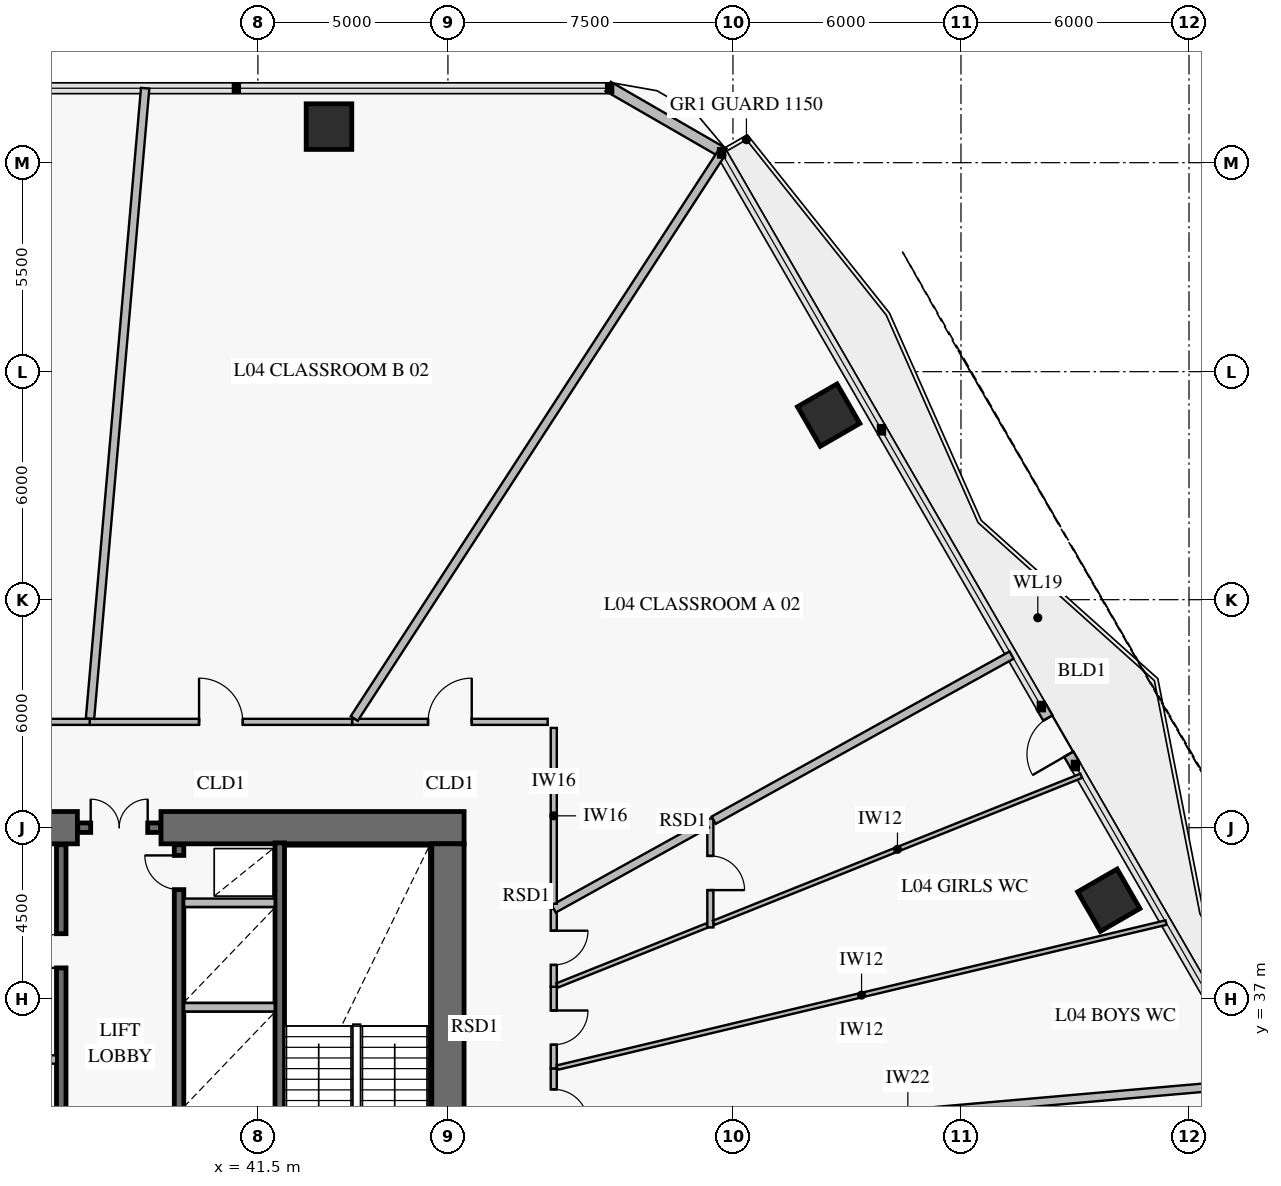
"""IFC4 building model, lengths in metres.
Left out: names, types, materials, properties, quantities, classifications, styles, units other than length and angle.
Written with IfcOpenShell. Run it as: python <this file> out.ifc"""

import sys

from ifc_helpers import new_model, si_unit, direction, frame, frame_2d, origin, origin_2d, place, context, subcontext, project, spatial, rectangle, extrude, element, fill, save


model = new_model("IFC4")
c1 = context("Model", 3, precision=1e-05, world=origin(), true_north=direction((0.0, 1.0)))
c2 = subcontext(c1, "Body", "Model", "MODEL_VIEW")
j1 = project(units=[si_unit("LENGTHUNIT", "METRE"), si_unit("PLANEANGLEUNIT", "RADIAN")], contexts=[c1])
p1 = place(None, origin())
s1 = spatial("IfcSite", under=j1, at=p1, CompositionType="ELEMENT")
p2 = place(p1, origin())
s2 = spatial("IfcBuilding", under=s1, at=p2, CompositionType="ELEMENT")
p3 = place(p2, frame((0.0, 0.0, 16.2)))
s3 = spatial("IfcBuildingStorey", under=s2, at=p3, CompositionType="ELEMENT", Elevation=16.2)
p4 = place(p3, frame((46.925, 41.5, 0.0), z_axis=(0.0, 0.0, 1.0), x_axis=(-1.0, 0.0, 0.0)))
e1 = element("IfcWall", 1, at=p4, inside=s3, PredefinedType="SHEAR", context=c2, shape_type="SweptSolid", body=[
    extrude(rectangle(XDim=7.975, YDim=0.85, at=frame_2d((3.988, 0.0))), origin(), (0.0, 0.0, 1.0), 4.2),
])
p5 = place(p3, frame((36.75, 41.5, 0.0), z_axis=(0.0, 0.0, 1.0), x_axis=(-1.0, 0.0, 0.0)))
e2 = element("IfcWall", 2, at=p5, inside=s3, PredefinedType="SHEAR", context=c2, shape_type="SweptSolid", body=[
    extrude(rectangle(XDim=11.675, YDim=0.85, at=frame_2d((5.837, 0.0))), origin(), (0.0, 0.0, 1.0), 4.2),
])
p6 = place(p5, frame((4.25, 0.0, 0.0)))
e3 = element("IfcOpeningElement", 3, at=p6, cuts=e2, PredefinedType="OPENING", context=c2, shape_type="SweptSolid", body=[
    extrude(rectangle(XDim=1.1, YDim=2.15, at=frame_2d((0.55, 1.075))), frame((0.0, 0.437, 0.0), z_axis=(0.0, -1.0, 0.0), x_axis=(1.0, 0.0, 0.0)), (0.0, 0.0, 1.0), 0.874),
])
p7 = place(p3, frame((46.5, 22.925, 0.0), z_axis=(0.0, 0.0, 1.0), x_axis=(0.0, 1.0, 0.0)))
e4 = element("IfcWall", 4, at=p7, inside=s3, PredefinedType="SHEAR", context=c2, shape_type="SweptSolid", body=[
    extrude(rectangle(XDim=18.15, YDim=0.85, at=frame_2d((9.075, 0.0))), origin(), (0.0, 0.0, 1.0), 4.2),
])
p8 = place(p7, frame((8.825, 0.0, 0.0)))
e5 = element("IfcOpeningElement", 5, at=p8, cuts=e4, PredefinedType="OPENING", context=c2, shape_type="SweptSolid", body=[
    extrude(rectangle(XDim=1.1, YDim=2.15, at=frame_2d((0.55, 1.075))), frame((0.0, 0.437, 0.0), z_axis=(0.0, -1.0, 0.0), x_axis=(1.0, 0.0, 0.0)), (0.0, 0.0, 1.0), 0.874),
])
for number, where, z_axis, x_axis in (
    (6, (63.889, 39.592, 0.0), (0.0, 0.0, 1.0), (-0.5, 0.866, 0.0)),
    (7, (56.519, 52.357, 0.0), (0.0, 0.0, 1.0), (-0.5, 0.866, 0.0)),
    (8, (43.37, 59.948, 0.0), (0.0, 0.0, 1.0), (-1.0, 0.0, 0.0)),
):
    element("IfcColumn", number, at=place(p3, frame(where, z_axis=z_axis, x_axis=x_axis)), inside=s3, PredefinedType="COLUMN", context=c2, shape_type="SweptSolid", body=[
        extrude(rectangle(XDim=1.2, YDim=1.2, at=origin_2d()), origin(), (0.0, 0.0, 1.0), 3.92),
    ])
p9 = place(p3, frame((50.717, 61.006, 0.0), z_axis=(0.0, 0.0, 1.0), x_axis=(0.866007452331, -0.500031091541, 0.0)))
e9 = element("IfcWall", 9, at=p9, inside=s3, PredefinedType="SOLIDWALL", context=c2, shape_type="SweptSolid", body=[
    extrude(rectangle(XDim=3.515, YDim=0.28, at=frame_2d((1.757, 0.0))), origin(), (0.0, 0.0, 1.0), 3.92),
])
p10 = place(p3, frame((62.114, 44.686, 0.0), z_axis=(0.0, 0.0, 1.0), x_axis=(0.499982180423, -0.866035691677, 0.0)))
e10 = element("IfcWall", 10, at=p10, inside=s3, PredefinedType="SOLIDWALL", context=c2, shape_type="SweptSolid", body=[
    extrude(rectangle(XDim=1.79, YDim=0.28, at=frame_2d((0.895, 0.0))), origin(), (0.0, 0.0, 1.0), 3.92),
])
p11 = place(p10, frame((0.345, 0.0, 0.0)))
e11 = element("IfcOpeningElement", 11, at=p11, cuts=e10, PredefinedType="OPENING", context=c2, shape_type="SweptSolid", body=[
    extrude(rectangle(XDim=1.1, YDim=2.2, at=frame_2d((0.55, 1.1))), frame((0.0, 0.152, 0.0), z_axis=(0.0, -1.0, 0.0), x_axis=(1.0, 0.0, 0.0)), (0.0, 0.0, 1.0), 0.304),
])
p12 = place(p3, frame((36.76, 41.5, 0.0), z_axis=(0.0, 0.0, 1.0), x_axis=(1.0, 0.0, 0.0)))
e12 = element("IfcWall", 12, at=p12, inside=s3, PredefinedType="SOLIDWALL", context=c2, shape_type="SweptSolid", body=[
    extrude(rectangle(XDim=2.18, YDim=0.25, at=frame_2d((1.09, 0.0))), origin(), (0.0, 0.0, 1.0), 4.2),
])
p13 = place(p12, frame((0.34, 0.0, 0.0)))
e13 = element("IfcOpeningElement", 13, at=p13, cuts=e12, PredefinedType="OPENING", context=c2, shape_type="SweptSolid", body=[
    extrude(rectangle(XDim=1.5, YDim=2.15, at=frame_2d((0.75, 1.075))), frame((0.0, 0.137, 0.0), z_axis=(0.0, -1.0, 0.0), x_axis=(1.0, 0.0, 0.0)), (0.0, 0.0, 1.0), 0.274),
])
p14 = place(p3, frame((42.075, 31.4, 0.0), z_axis=(0.0, 0.0, 1.0), x_axis=(0.0, 1.0, 0.0)))
e14 = element("IfcWall", 14, at=p14, inside=s3, PredefinedType="SOLIDWALL", context=c2, shape_type="SweptSolid", body=[
    extrude(rectangle(XDim=9.7, YDim=0.25, at=frame_2d((4.85, 0.0))), origin(), (0.0, 0.0, 1.0), 4.2),
])
p15 = place(p3, frame((36.325, 31.4, 0.0), z_axis=(0.0, 0.0, 1.0), x_axis=(0.0, 1.0, 0.0)))
e15 = element("IfcWall", 15, at=p15, inside=s3, PredefinedType="SOLIDWALL", context=c2, shape_type="SweptSolid", body=[
    extrude(rectangle(XDim=9.65, YDim=0.25, at=frame_2d((4.825, 0.0))), origin(), (0.0, 0.0, 1.0), 4.2),
])
p16 = place(p15, frame((1.49, 0.0, 0.0)))
e16 = element("IfcOpeningElement", 16, at=p16, cuts=e15, PredefinedType="OPENING", context=c2, shape_type="SweptSolid", body=[
    extrude(rectangle(XDim=0.9, YDim=2.1, at=frame_2d((0.45, 1.05))), frame((0.0, 0.137, 0.0), z_axis=(0.0, -1.0, 0.0), x_axis=(1.0, 0.0, 0.0)), (0.0, 0.0, 1.0), 0.274),
])
p17 = place(p15, frame((6.41, 0.0, 0.0)))
e17 = element("IfcOpeningElement", 17, at=p17, cuts=e15, PredefinedType="OPENING", context=c2, shape_type="SweptSolid", body=[
    extrude(rectangle(XDim=0.9, YDim=2.1, at=frame_2d((0.45, 1.05))), frame((0.0, 0.137, 0.0), z_axis=(0.0, -1.0, 0.0), x_axis=(1.0, 0.0, 0.0)), (0.0, 0.0, 1.0), 0.274),
])
p18 = place(p3, frame((39.425, 31.4, 0.0), z_axis=(0.0, 0.0, 1.0), x_axis=(0.0, 1.0, 0.0)))
e18 = element("IfcWall", 18, at=p18, inside=s3, PredefinedType="SOLIDWALL", context=c2, shape_type="SweptSolid", body=[
    extrude(rectangle(XDim=9.65, YDim=0.25, at=frame_2d((4.825, 0.0))), origin(), (0.0, 0.0, 1.0), 4.2),
])
p19 = place(p18, frame((8.47, 0.0, 0.0)))
e19 = element("IfcOpeningElement", 19, at=p19, cuts=e18, PredefinedType="OPENING", context=c2, shape_type="SweptSolid", body=[
    extrude(rectangle(XDim=0.9, YDim=2.1, at=frame_2d((0.45, 1.05))), frame((0.0, 0.137, 0.0), z_axis=(0.0, -1.0, 0.0), x_axis=(1.0, 0.0, 0.0)), (0.0, 0.0, 1.0), 0.274),
])
p20 = place(p3, frame((49.285, 33.162, 0.0), z_axis=(0.0, 0.0, 1.0), x_axis=(0.0, 1.0, 0.0)))
e20 = element("IfcWall", 20, at=p20, inside=s3, PredefinedType="PARTITIONING", context=c2, shape_type="SweptSolid", body=[
    extrude(rectangle(XDim=2.002, YDim=0.16, at=frame_2d((1.001, 0.0))), origin(), (0.0, 0.0, 1.0), 3.92),
])
p21 = place(p20, frame((0.551, 0.0, 0.0)))
e21 = element("IfcOpeningElement", 21, at=p21, cuts=e20, PredefinedType="OPENING", context=c2, shape_type="SweptSolid", body=[
    extrude(rectangle(XDim=0.9, YDim=2.1, at=frame_2d((0.45, 1.05))), frame((0.0, 0.092, 0.0), z_axis=(0.0, -1.0, 0.0), x_axis=(1.0, 0.0, 0.0)), (0.0, 0.0, 1.0), 0.184),
])
p22 = place(p3, frame((49.285, 35.165, 0.0), z_axis=(0.0, 0.0, 1.0), x_axis=(0.0, 1.0, 0.0)))
e22 = element("IfcWall", 22, at=p22, inside=s3, PredefinedType="PARTITIONING", context=c2, shape_type="SweptSolid", body=[
    extrude(rectangle(XDim=2.149, YDim=0.16, at=frame_2d((1.074, 0.0))), origin(), (0.0, 0.0, 1.0), 3.22),
])
p23 = place(p22, frame((0.624, 0.0, 0.0)))
e23 = element("IfcOpeningElement", 23, at=p23, cuts=e22, PredefinedType="OPENING", context=c2, shape_type="SweptSolid", body=[
    extrude(rectangle(XDim=0.9, YDim=2.1, at=frame_2d((0.45, 1.05))), frame((0.0, 0.092, 0.0), z_axis=(0.0, -1.0, 0.0), x_axis=(1.0, 0.0, 0.0)), (0.0, 0.0, 1.0), 0.184),
])
p24 = place(p3, frame((53.405, 41.739, 0.0), z_axis=(0.0, 0.0, 1.0), x_axis=(0.0, -1.0, 0.0)))
e24 = element("IfcWall", 24, at=p24, inside=s3, PredefinedType="PARTITIONING", context=c2, shape_type="SweptSolid", body=[
    extrude(rectangle(XDim=2.864, YDim=0.16, at=frame_2d((1.432, 0.0))), origin(), (0.0, 0.0, 1.0), 3.92),
])
p25 = place(p24, frame((0.982, 0.0, 0.0)))
e25 = element("IfcOpeningElement", 25, at=p25, cuts=e24, PredefinedType="OPENING", context=c2, shape_type="SweptSolid", body=[
    extrude(rectangle(XDim=0.9, YDim=2.1, at=frame_2d((0.45, 1.05))), frame((0.0, 0.092, 0.0), z_axis=(0.0, -1.0, 0.0), x_axis=(1.0, 0.0, 0.0)), (0.0, 0.0, 1.0), 0.184),
])
p26 = place(p3, frame((49.285, 37.314, 0.0), z_axis=(0.0, 0.0, 1.0), x_axis=(0.0, 1.0, 0.0)))
e26 = element("IfcWall", 26, at=p26, inside=s3, PredefinedType="PARTITIONING", context=c2, shape_type="SweptSolid", body=[
    extrude(rectangle(XDim=2.05, YDim=0.16, at=frame_2d((1.025, 0.0))), origin(), (0.0, 0.0, 1.0), 3.92),
])
p27 = place(p26, frame((0.575, 0.0, 0.0)))
e27 = element("IfcOpeningElement", 27, at=p27, cuts=e26, PredefinedType="OPENING", context=c2, shape_type="SweptSolid", body=[
    extrude(rectangle(XDim=0.9, YDim=2.1, at=frame_2d((0.45, 1.05))), frame((0.0, 0.092, 0.0), z_axis=(0.0, -1.0, 0.0), x_axis=(1.0, 0.0, 0.0)), (0.0, 0.0, 1.0), 0.184),
])
p28 = place(p3, frame((49.125, 44.285, 0.0), z_axis=(0.0, 0.0, 1.0), x_axis=(-1.0, 0.0, 0.0)))
e28 = element("IfcWall", 28, at=p28, inside=s3, PredefinedType="PARTITIONING", context=c2, shape_type="SweptSolid", body=[
    extrude(rectangle(XDim=5.147, YDim=0.16, at=frame_2d((2.573, 0.0))), origin(), (0.0, 0.0, 1.0), 3.22),
])
p29 = place(p28, frame((1.999, 0.0, 0.0)))
e29 = element("IfcOpeningElement", 29, at=p29, cuts=e28, PredefinedType="OPENING", context=c2, shape_type="SweptSolid", body=[
    extrude(rectangle(XDim=1.15, YDim=2.2, at=frame_2d((0.575, 1.1))), frame((0.0, 0.092, 0.0), z_axis=(0.0, -1.0, 0.0), x_axis=(1.0, 0.0, 0.0)), (0.0, 0.0, 1.0), 0.184),
])
p30 = place(p3, frame((43.978, 44.285, 0.0), z_axis=(0.0, 0.0, 1.0), x_axis=(-1.0, 0.0, 0.0)))
e30 = element("IfcWall", 30, at=p30, inside=s3, PredefinedType="PARTITIONING", context=c2, shape_type="SweptSolid", body=[
    extrude(rectangle(XDim=6.903, YDim=0.16, at=frame_2d((3.452, 0.0))), origin(), (0.0, 0.0, 1.0), 3.22),
])
p31 = place(p30, frame((2.877, 0.0, 0.0)))
e31 = element("IfcOpeningElement", 31, at=p31, cuts=e30, PredefinedType="OPENING", context=c2, shape_type="SweptSolid", body=[
    extrude(rectangle(XDim=1.15, YDim=2.2, at=frame_2d((0.575, 1.1))), frame((0.0, 0.092, 0.0), z_axis=(0.0, -1.0, 0.0), x_axis=(1.0, 0.0, 0.0)), (0.0, 0.0, 1.0), 0.184),
])
p32 = place(p3, frame((37.075, 44.285, 0.0), z_axis=(0.0, 0.0, 1.0), x_axis=(-1.0, 0.0, 0.0)))
e32 = element("IfcWall", 32, at=p32, inside=s3, PredefinedType="PARTITIONING", context=c2, shape_type="SweptSolid", body=[
    extrude(rectangle(XDim=11.754, YDim=0.16, at=frame_2d((5.877, 0.0))), origin(), (0.0, 0.0, 1.0), 3.22),
])
p33 = place(p32, frame((5.302, 0.0, 0.0)))
e33 = element("IfcOpeningElement", 33, at=p33, cuts=e32, PredefinedType="OPENING", context=c2, shape_type="SweptSolid", body=[
    extrude(rectangle(XDim=1.15, YDim=2.2, at=frame_2d((0.575, 1.1))), frame((0.0, 0.092, 0.0), z_axis=(0.0, -1.0, 0.0), x_axis=(1.0, 0.0, 0.0)), (0.0, 0.0, 1.0), 0.184),
])
p34 = place(p3, frame((34.108, 35.4, 0.0), z_axis=(0.0, 0.0, 1.0), x_axis=(1.0, 0.0, 0.0)))
e34 = element("IfcWall", 34, at=p34, inside=s3, PredefinedType="PARTITIONING", context=c2, shape_type="SweptSolid", body=[
    extrude(rectangle(XDim=2.084, YDim=0.22, at=frame_2d((1.042, 0.0))), origin(), (0.0, 0.0, 1.0), 3.92),
])
for number, where, z_axis, x_axis in (
    (35, (39.558, 36.775, 0.0), (0.0, 0.0, 1.0), (1.0, 0.0, 0.0)),
    (36, (39.558, 39.525, 0.0), (0.0, 0.0, 1.0), (1.0, 0.0, 0.0)),
):
    element("IfcWall", number, at=place(p3, frame(where, z_axis=z_axis, x_axis=x_axis)), inside=s3, PredefinedType="PARTITIONING", context=c2, shape_type="SweptSolid", body=[
        extrude(rectangle(XDim=2.384, YDim=0.22, at=frame_2d((1.192, 0.0))), origin(), (0.0, 0.0, 1.0), 3.92),
    ])
p35 = place(p3, frame((49.373, 33.17, 0.0), z_axis=(0.0, 0.0, 1.0), x_axis=(0.99619391773, 0.087164661858, 0.0)))
e37 = element("IfcWall", 37, at=p35, inside=s3, PredefinedType="PARTITIONING", context=c2, shape_type="SweptSolid", body=[
    extrude(rectangle(XDim=18.528, YDim=0.22, at=frame_2d((9.264, 0.0))), origin(), (0.0, 0.0, 1.0), 3.17),
])
p36 = place(p3, frame((49.373, 35.186, 0.0), z_axis=(0.0, 0.0, 1.0), x_axis=(0.972774396977, 0.231754120968, 0.0)))
e38 = element("IfcWall", 38, at=p36, inside=s3, PredefinedType="PARTITIONING", context=c2, shape_type="SweptSolid", body=[
    extrude(rectangle(XDim=16.471, YDim=0.12, at=frame_2d((8.235, 0.0))), origin(), (0.0, 0.0, 1.0), 3.17),
])
p37 = place(p3, frame((49.373, 37.349, 0.0), z_axis=(0.0, 0.0, 1.0), x_axis=(0.928488582268, 0.371360946517, 0.0)))
e39 = element("IfcWall", 39, at=p37, inside=s3, PredefinedType="PARTITIONING", context=c2, shape_type="SweptSolid", body=[
    extrude(rectangle(XDim=4.248, YDim=0.12, at=frame_2d((2.124, 0.0))), origin(), (0.0, 0.0, 1.0), 3.92),
])
p38 = place(p3, frame((53.493, 38.997, 0.0), z_axis=(0.0, 0.0, 1.0), x_axis=(0.928486388213, 0.371366432117, 0.0)))
e40 = element("IfcWall", 40, at=p38, inside=s3, PredefinedType="PARTITIONING", context=c2, shape_type="SweptSolid", body=[
    extrude(rectangle(XDim=10.417, YDim=0.12, at=frame_2d((5.208, 0.0))), origin(), (0.0, 0.0, 1.0), 3.17),
])
p39 = place(p3, frame((49.285, 39.364, 0.0), z_axis=(0.0, 0.0, 1.0), x_axis=(0.874606547494, 0.484833360115, 0.0)))
e41 = element("IfcWall", 41, at=p39, inside=s3, PredefinedType="PARTITIONING", context=c2, shape_type="SweptSolid", body=[
    extrude(rectangle(XDim=4.61, YDim=0.22, at=frame_2d((2.305, 0.0))), origin(), (0.0, 0.0, 1.0), 3.92),
])
p40 = place(p3, frame((53.493, 41.697, 0.0), z_axis=(0.0, 0.0, 1.0), x_axis=(0.874622025543, 0.484805437711, 0.0)))
e42 = element("IfcWall", 42, at=p40, inside=s3, PredefinedType="PARTITIONING", context=c2, shape_type="SweptSolid", body=[
    extrude(rectangle(XDim=8.962, YDim=0.22, at=frame_2d((4.481, 0.0))), origin(), (0.0, 0.0, 1.0), 3.17),
])
p41 = place(p3, frame((44.035, 44.373, 0.0), z_axis=(0.0, 0.0, 1.0), x_axis=(0.544634848015, 0.838673287, 0.0)))
e43 = element("IfcWall", 43, at=p41, inside=s3, PredefinedType="PARTITIONING", context=c2, shape_type="SweptSolid", body=[
    extrude(rectangle(XDim=17.748, YDim=0.22, at=frame_2d((8.874, 0.0))), origin(), (0.0, 0.0, 1.0), 3.17),
])
p42 = place(p3, frame((49.285, 39.499, 0.0), z_axis=(0.0, 0.0, 1.0), x_axis=(0.0, 1.0, 0.0)))
e44 = element("IfcWall", 44, at=p42, inside=s3, PredefinedType="PARTITIONING", context=c2, shape_type="SweptSolid", body=[
    extrude(rectangle(XDim=4.626, YDim=0.16, at=frame_2d((2.313, 0.0))), origin(), (0.0, 0.0, 1.0), 3.92),
])
p43 = place(p3, frame((37.083, 44.373, 0.0), z_axis=(0.0, 0.0, 1.0), x_axis=(0.087149123156, 0.996195277209, 0.0)))
e45 = element("IfcWall", 45, at=p43, inside=s3, PredefinedType="PARTITIONING", context=c2, shape_type="SweptSolid", body=[
    extrude(rectangle(XDim=16.649, YDim=0.22, at=frame_2d((8.324, 0.0))), origin(), (0.0, 0.0, 1.0), 3.17),
])
p44 = place(p11, frame((1.1, 0.0, 0.0), z_axis=(0.0, 0.0, 1.0), x_axis=(-1.0, 0.0, 0.0)))
e46 = element("IfcDoor", 46, at=p44, inside=s3, OperationType="SINGLE_SWING_LEFT", PredefinedType="DOOR", context=c2, shape_type="SweptSolid", body=[
    extrude(rectangle(XDim=1.1, YDim=2.2, at=frame_2d((0.55, 1.1))), frame((0.0, 0.025, 0.0), z_axis=(0.0, -1.0, 0.0), x_axis=(1.0, 0.0, 0.0)), (0.0, 0.0, 1.0), 0.05),
])
fill(e11, e46)
p45 = place(p13, origin())
e47 = element("IfcDoor", 47, at=p45, inside=s3, OperationType="DOUBLE_DOOR_SINGLE_SWING", PredefinedType="DOOR", context=c2, shape_type="SweptSolid", body=[
    extrude(rectangle(XDim=1.5, YDim=2.15, at=frame_2d((0.75, 1.075))), frame((0.0, 0.025, 0.0), z_axis=(0.0, -1.0, 0.0), x_axis=(1.0, 0.0, 0.0)), (0.0, 0.0, 1.0), 0.05),
])
fill(e13, e47)
p46 = place(p17, origin())
e48 = element("IfcDoor", 48, at=p46, inside=s3, OperationType="SINGLE_SWING_LEFT", PredefinedType="DOOR", context=c2, shape_type="SweptSolid", body=[
    extrude(rectangle(XDim=0.9, YDim=2.1, at=frame_2d((0.45, 1.05))), frame((0.0, 0.025, 0.0), z_axis=(0.0, -1.0, 0.0), x_axis=(1.0, 0.0, 0.0)), (0.0, 0.0, 1.0), 0.05),
])
fill(e17, e48)
p47 = place(p19, origin())
e49 = element("IfcDoor", 49, at=p47, inside=s3, OperationType="SINGLE_SWING_RIGHT", PredefinedType="DOOR", context=c2, shape_type="SweptSolid", body=[
    extrude(rectangle(XDim=0.9, YDim=2.1, at=frame_2d((0.45, 1.05))), frame((0.0, 0.025, 0.0), z_axis=(0.0, -1.0, 0.0), x_axis=(1.0, 0.0, 0.0)), (0.0, 0.0, 1.0), 0.05),
])
fill(e19, e49)
p48 = place(p21, frame((0.9, 0.0, 0.0), z_axis=(0.0, 0.0, 1.0), x_axis=(-1.0, 0.0, 0.0)))
e50 = element("IfcDoor", 50, at=p48, inside=s3, OperationType="SINGLE_SWING_RIGHT", PredefinedType="DOOR", context=c2, shape_type="SweptSolid", body=[
    extrude(rectangle(XDim=0.9, YDim=2.1, at=frame_2d((0.45, 1.05))), frame((0.0, 0.025, 0.0), z_axis=(0.0, -1.0, 0.0), x_axis=(1.0, 0.0, 0.0)), (0.0, 0.0, 1.0), 0.05),
])
fill(e21, e50)
p49 = place(p23, frame((0.9, 0.0, 0.0), z_axis=(0.0, 0.0, 1.0), x_axis=(-1.0, 0.0, 0.0)))
e51 = element("IfcDoor", 51, at=p49, inside=s3, OperationType="SINGLE_SWING_LEFT", PredefinedType="DOOR", context=c2, shape_type="SweptSolid", body=[
    extrude(rectangle(XDim=0.9, YDim=2.1, at=frame_2d((0.45, 1.05))), frame((0.0, 0.025, 0.0), z_axis=(0.0, -1.0, 0.0), x_axis=(1.0, 0.0, 0.0)), (0.0, 0.0, 1.0), 0.05),
])
fill(e23, e51)
p50 = place(p25, origin())
e52 = element("IfcDoor", 52, at=p50, inside=s3, OperationType="SINGLE_SWING_RIGHT", PredefinedType="DOOR", context=c2, shape_type="SweptSolid", body=[
    extrude(rectangle(XDim=0.9, YDim=2.1, at=frame_2d((0.45, 1.05))), frame((0.0, 0.025, 0.0), z_axis=(0.0, -1.0, 0.0), x_axis=(1.0, 0.0, 0.0)), (0.0, 0.0, 1.0), 0.05),
])
fill(e25, e52)
p51 = place(p27, frame((0.9, 0.0, 0.0), z_axis=(0.0, 0.0, 1.0), x_axis=(-1.0, 0.0, 0.0)))
e53 = element("IfcDoor", 53, at=p51, inside=s3, OperationType="SINGLE_SWING_LEFT", PredefinedType="DOOR", context=c2, shape_type="SweptSolid", body=[
    extrude(rectangle(XDim=0.9, YDim=2.1, at=frame_2d((0.45, 1.05))), frame((0.0, 0.025, 0.0), z_axis=(0.0, -1.0, 0.0), x_axis=(1.0, 0.0, 0.0)), (0.0, 0.0, 1.0), 0.05),
])
fill(e27, e53)
p52 = place(p29, frame((1.15, 0.0, 0.0), z_axis=(0.0, 0.0, 1.0), x_axis=(-1.0, 0.0, 0.0)))
e54 = element("IfcDoor", 54, at=p52, inside=s3, OperationType="SINGLE_SWING_RIGHT", PredefinedType="DOOR", context=c2, shape_type="SweptSolid", body=[
    extrude(rectangle(XDim=1.15, YDim=2.2, at=frame_2d((0.575, 1.1))), frame((0.0, 0.025, 0.0), z_axis=(0.0, -1.0, 0.0), x_axis=(1.0, 0.0, 0.0)), (0.0, 0.0, 1.0), 0.05),
])
fill(e29, e54)
p53 = place(p31, frame((1.15, 0.0, 0.0), z_axis=(0.0, 0.0, 1.0), x_axis=(-1.0, 0.0, 0.0)))
e55 = element("IfcDoor", 55, at=p53, inside=s3, OperationType="SINGLE_SWING_LEFT", PredefinedType="DOOR", context=c2, shape_type="SweptSolid", body=[
    extrude(rectangle(XDim=1.15, YDim=2.2, at=frame_2d((0.575, 1.1))), frame((0.0, 0.025, 0.0), z_axis=(0.0, -1.0, 0.0), x_axis=(1.0, 0.0, 0.0)), (0.0, 0.0, 1.0), 0.05),
])
fill(e31, e55)
save(model, sys.argv[1])
